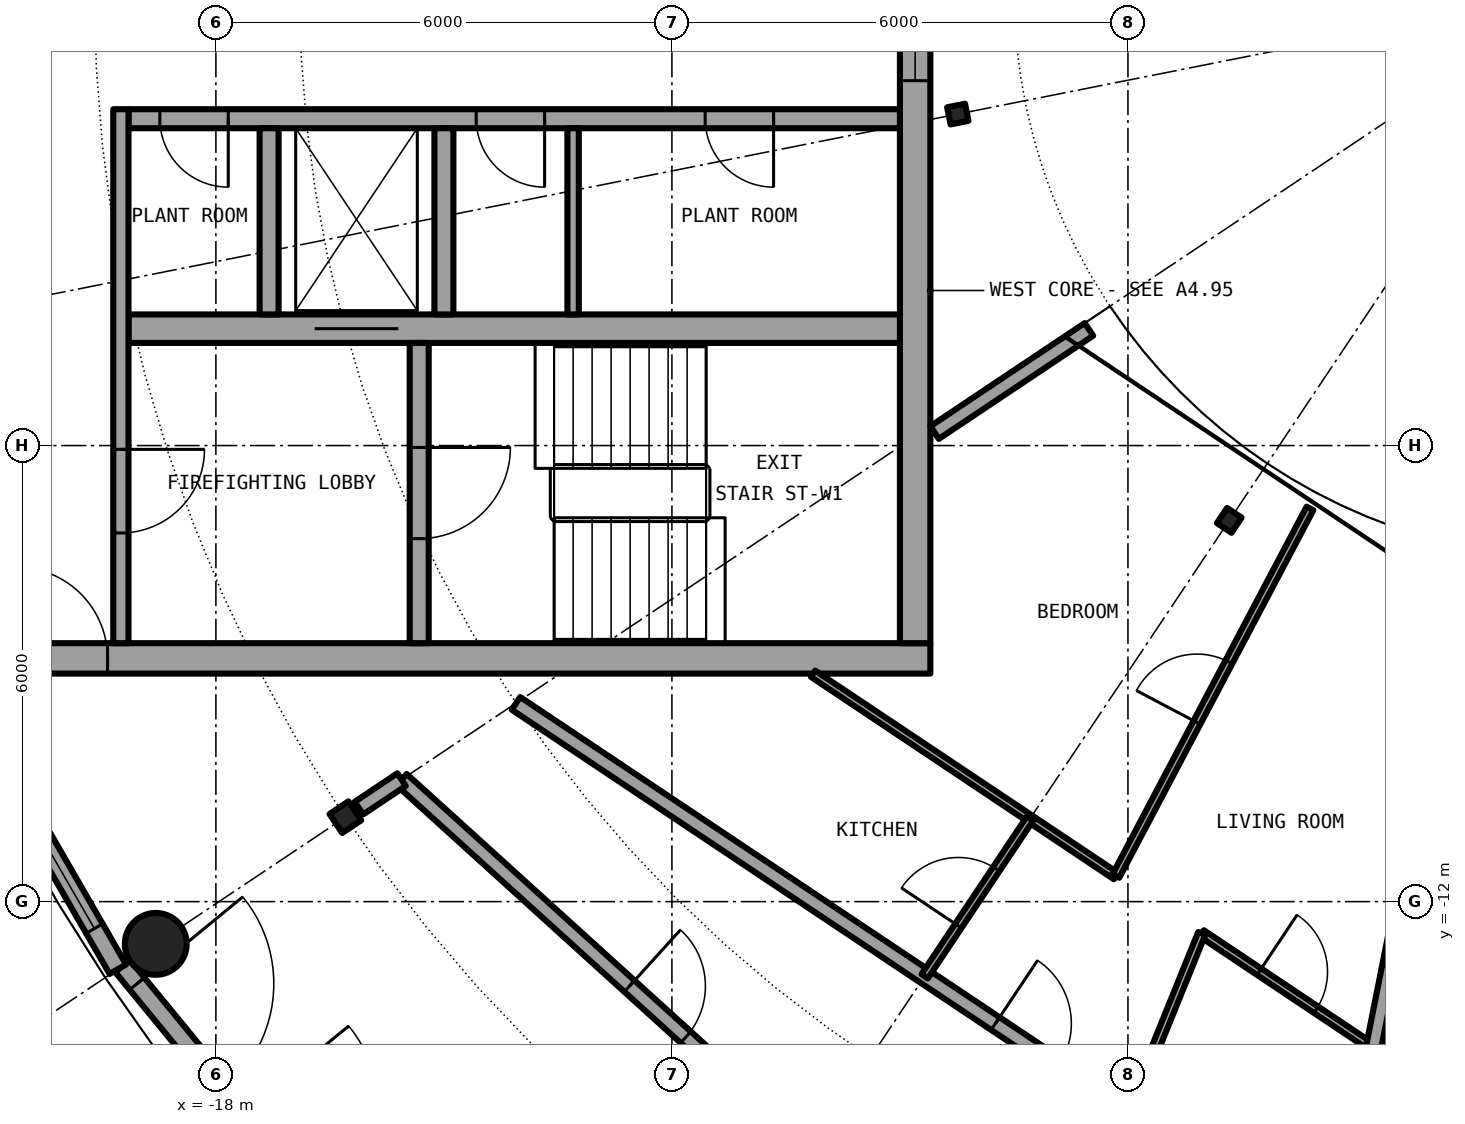
"""IFC4 building model, lengths in metres.
Left out: names, types, materials, properties, quantities, classifications, styles, units other than length and angle.
Written with IfcOpenShell. Run it as: python <this file> out.ifc"""

import sys

from ifc_helpers import new_model, si_unit, direction, frame, frame_2d, origin, origin_2d, place, context, subcontext, project, spatial, rectangle, hollow_circle, i_section, extrude, element, fill, save


model = new_model("IFC4")
c1 = context("Model", 3, precision=1e-05, world=origin(), true_north=direction((0.0, 1.0)))
c2 = subcontext(c1, "Body", "Model", "MODEL_VIEW")
j1 = project(units=[si_unit("LENGTHUNIT", "METRE"), si_unit("PLANEANGLEUNIT", "RADIAN")], contexts=[c1])
p1 = place(None, origin())
s1 = spatial("IfcSite", under=j1, at=p1, CompositionType="ELEMENT")
p2 = place(p1, origin())
s2 = spatial("IfcBuilding", under=s1, at=p2, CompositionType="ELEMENT")
p3 = place(p2, frame((0.0, 0.0, 249.3)))
s3 = spatial("IfcBuildingStorey", under=s2, at=p3, CompositionType="ELEMENT", Elevation=249.3)
p4 = place(p3, frame((-18.791, -12.556, 0.0), z_axis=(0.0, 0.0, 1.0), x_axis=(1.0, 0.0, 0.0)))
e1 = element("IfcColumn", 1, at=p4, inside=s3, PredefinedType="COLUMN", context=c2, shape_type="SweptSolid", body=[
    extrude(hollow_circle(Radius=0.406, WallThickness=0.03, at=origin_2d()), origin(), (0.0, 0.0, 1.0), 3.05),
])
p5 = place(p3, frame((-16.297, -10.889, 0.0), z_axis=(0.0, 0.0, 1.0), x_axis=(-0.831469612303, -0.55557023302, 0.0)))
e2 = element("IfcColumn", 2, at=p5, inside=s3, PredefinedType="COLUMN", context=c2, shape_type="SweptSolid", body=[
    extrude(i_section(OverallWidth=0.3, OverallDepth=0.3, WebThickness=0.011, FlangeThickness=0.019, FilletRadius=0.027, at=origin_2d()), origin(), (0.0, 0.0, 1.0), 3.05),
])
for number, where, z_axis, x_axis in (
    (3, (-8.239, -1.639, 0.0), (0.0, 0.0, 1.0), (-0.981, -0.195, 0.0)),
    (4, (-4.667, -6.984, 0.0), (0.0, 0.0, 1.0), (-0.556, -0.831, 0.0)),
):
    element("IfcColumn", number, at=place(p3, frame(where, z_axis=z_axis, x_axis=x_axis)), inside=s3, PredefinedType="COLUMN", context=c2, shape_type="SweptSolid", body=[
        extrude(i_section(OverallWidth=0.24, OverallDepth=0.23, WebThickness=0.008, FlangeThickness=0.012, FilletRadius=0.021, at=origin_2d()), origin(), (0.0, 0.0, 1.0), 3.05),
    ])
p6 = place(p3, frame((-19.228, -12.848, 0.0), z_axis=(0.0, 0.0, 1.0), x_axis=(0.634418942337, -0.772989395532, 0.0)))
e5 = element("IfcWall", 5, at=p6, inside=s3, PredefinedType="SOLIDWALL", context=c2, shape_type="SweptSolid", body=[
    extrude(rectangle(XDim=4.533, YDim=0.25, at=frame_2d((2.267, 0.0))), origin(), (0.0, 0.0, 1.0), 2.7),
])
p7 = place(p6, frame((0.3, 0.0, 0.0)))
e6 = element("IfcOpeningElement", 6, at=p7, cuts=e5, PredefinedType="OPENING", context=c2, shape_type="SweptSolid", body=[
    extrude(rectangle(XDim=1.8, YDim=2.2, at=frame_2d((0.9, 1.1))), frame((0.0, 0.135, 0.0), z_axis=(0.0, -1.0, 0.0), x_axis=(1.0, 0.0, 0.0)), (0.0, 0.0, 1.0), 0.27),
])
p8 = place(p6, frame((2.497, 0.0, 0.0)))
e7 = element("IfcOpeningElement", 7, at=p8, cuts=e5, PredefinedType="OPENING", context=c2, shape_type="SweptSolid", body=[
    extrude(rectangle(XDim=1.8, YDim=2.2, at=frame_2d((0.9, 1.1))), frame((0.0, 0.135, 0.0), z_axis=(0.0, -1.0, 0.0), x_axis=(1.0, 0.0, 0.0)), (0.0, 0.0, 1.0), 0.27),
])
p9 = place(p3, frame((-20.807, -10.261, 0.0), z_axis=(0.0, 0.0, 1.0), x_axis=(0.499903546559, -0.866081084043, 0.0)))
e8 = element("IfcWall", 8, at=p9, inside=s3, PredefinedType="SOLIDWALL", context=c2, shape_type="SweptSolid", body=[
    extrude(rectangle(XDim=3.034, YDim=0.25, at=frame_2d((1.517, 0.0))), origin(), (0.0, 0.0, 1.0), 2.7),
])
p10 = place(p9, frame((0.617, 0.0, 0.3)))
e9 = element("IfcOpeningElement", 9, at=p10, cuts=e8, PredefinedType="OPENING", context=c2, shape_type="SweptSolid", body=[
    extrude(rectangle(XDim=1.8, YDim=2.1, at=frame_2d((0.9, 1.05))), frame((0.0, 0.135, 0.0), z_axis=(0.0, -1.0, 0.0), x_axis=(1.0, 0.0, 0.0)), (0.0, 0.0, 1.0), 0.27),
])
p11 = place(p3, frame((-21.1, -8.8, 0.0), z_axis=(0.0, 0.0, 1.0), x_axis=(1.0, 0.0, 0.0)))
e10 = element("IfcWall", 10, at=p11, inside=s3, PredefinedType="SHEAR", context=c2, shape_type="SweptSolid", body=[
    extrude(rectangle(XDim=12.5, YDim=0.4, at=frame_2d((6.25, 0.0))), origin(), (0.0, 0.0, 1.0), 3.05),
])
p12 = place(p11, frame((0.475, 0.0, 0.0)))
e11 = element("IfcOpeningElement", 11, at=p12, cuts=e10, PredefinedType="OPENING", context=c2, shape_type="SweptSolid", body=[
    extrude(rectangle(XDim=1.2, YDim=2.3, at=frame_2d((0.6, 1.15))), frame((0.0, 0.21, 0.0), z_axis=(0.0, -1.0, 0.0), x_axis=(1.0, 0.0, 0.0)), (0.0, 0.0, 1.0), 0.42),
])
p13 = place(p3, frame((-8.8, 8.6, 0.0), z_axis=(0.0, 0.0, 1.0), x_axis=(0.0, -1.0, 0.0)))
e12 = element("IfcWall", 12, at=p13, inside=s3, PredefinedType="SHEAR", context=c2, shape_type="SweptSolid", body=[
    extrude(rectangle(XDim=17.2, YDim=0.4, at=frame_2d((8.6, 0.0))), origin(), (0.0, 0.0, 1.0), 3.05),
])
p14 = place(p13, frame((7.4, 0.0, 0.1)))
e13 = element("IfcOpeningElement", 13, at=p14, cuts=e12, PredefinedType="OPENING", context=c2, shape_type="SweptSolid", body=[
    extrude(rectangle(XDim=2.4, YDim=2.2, at=frame_2d((1.2, 1.1))), frame((0.0, 0.21, 0.0), z_axis=(0.0, -1.0, 0.0), x_axis=(1.0, 0.0, 0.0)), (0.0, 0.0, 1.0), 0.42),
])
p15 = place(p3, frame((-9.0, -1.7, 0.0), z_axis=(0.0, 0.0, 1.0), x_axis=(-1.0, 0.0, 0.0)))
e14 = element("IfcWall", 14, at=p15, inside=s3, PredefinedType="SHEAR", context=c2, shape_type="SweptSolid", body=[
    extrude(rectangle(XDim=10.15, YDim=0.25, at=frame_2d((5.075, 0.0))), origin(), (0.0, 0.0, 1.0), 3.05),
])
p16 = place(p15, frame((1.663, 0.0, 0.0)))
e15 = element("IfcOpeningElement", 15, at=p16, cuts=e14, PredefinedType="OPENING", context=c2, shape_type="SweptSolid", body=[
    extrude(rectangle(XDim=0.9, YDim=2.3, at=frame_2d((0.45, 1.15))), frame((0.0, 0.135, 0.0), z_axis=(0.0, -1.0, 0.0), x_axis=(1.0, 0.0, 0.0)), (0.0, 0.0, 1.0), 0.27),
])
p17 = place(p15, frame((4.675, 0.0, 0.0)))
e16 = element("IfcOpeningElement", 16, at=p17, cuts=e14, PredefinedType="OPENING", context=c2, shape_type="SweptSolid", body=[
    extrude(rectangle(XDim=0.9, YDim=2.3, at=frame_2d((0.45, 1.15))), frame((0.0, 0.135, 0.0), z_axis=(0.0, -1.0, 0.0), x_axis=(1.0, 0.0, 0.0)), (0.0, 0.0, 1.0), 0.27),
])
p18 = place(p15, frame((8.837, 0.0, 0.0)))
e17 = element("IfcOpeningElement", 17, at=p18, cuts=e14, PredefinedType="OPENING", context=c2, shape_type="SweptSolid", body=[
    extrude(rectangle(XDim=0.9, YDim=2.3, at=frame_2d((0.45, 1.15))), frame((0.0, 0.135, 0.0), z_axis=(0.0, -1.0, 0.0), x_axis=(1.0, 0.0, 0.0)), (0.0, 0.0, 1.0), 0.27),
])
p19 = place(p3, frame((-9.0, -4.462, 0.0), z_axis=(0.0, 0.0, 1.0), x_axis=(-1.0, 0.0, 0.0)))
e18 = element("IfcWall", 18, at=p19, inside=s3, PredefinedType="SHEAR", context=c2, shape_type="SweptSolid", body=[
    extrude(rectangle(XDim=10.15, YDim=0.375, at=frame_2d((5.075, 0.0))), origin(), (0.0, 0.0, 1.0), 3.05),
])
p20 = place(p19, frame((6.6, 0.0, 0.0)))
e19 = element("IfcOpeningElement", 19, at=p20, cuts=e18, PredefinedType="OPENING", context=c2, shape_type="SweptSolid", body=[
    extrude(rectangle(XDim=1.1, YDim=2.3, at=frame_2d((0.55, 1.15))), frame((0.0, 0.198, 0.0), z_axis=(0.0, -1.0, 0.0), x_axis=(1.0, 0.0, 0.0)), (0.0, 0.0, 1.0), 0.395),
])
p21 = place(p3, frame((-15.325, -4.65, 0.0), z_axis=(0.0, 0.0, 1.0), x_axis=(0.0, -1.0, 0.0)))
e20 = element("IfcWall", 20, at=p21, inside=s3, PredefinedType="SHEAR", context=c2, shape_type="SweptSolid", body=[
    extrude(rectangle(XDim=3.95, YDim=0.25, at=frame_2d((1.975, 0.0))), origin(), (0.0, 0.0, 1.0), 3.05),
])
p22 = place(p21, frame((1.375, 0.0, 0.0)))
e21 = element("IfcOpeningElement", 21, at=p22, cuts=e20, PredefinedType="OPENING", context=c2, shape_type="SweptSolid", body=[
    extrude(rectangle(XDim=1.2, YDim=2.3, at=frame_2d((0.6, 1.15))), frame((0.0, 0.135, 0.0), z_axis=(0.0, -1.0, 0.0), x_axis=(1.0, 0.0, 0.0)), (0.0, 0.0, 1.0), 0.27),
])
for number, where, z_axis, x_axis in (
    (22, (-15.0, -1.825, 0.0), (0.0, 0.0, 1.0), (0.0, -1.0, 0.0)),
    (23, (-17.3, -1.825, 0.0), (0.0, 0.0, 1.0), (0.0, -1.0, 0.0)),
):
    element("IfcWall", number, at=place(p3, frame(where, z_axis=z_axis, x_axis=x_axis)), inside=s3, PredefinedType="SOLIDWALL", context=c2, shape_type="SweptSolid", body=[
        extrude(rectangle(XDim=2.45, YDim=0.25, at=frame_2d((1.225, 0.0))), origin(), (0.0, 0.0, 1.0), 2.7),
    ])
p23 = place(p3, frame((-19.25, -1.575, 0.0), z_axis=(0.0, 0.0, 1.0), x_axis=(0.0, -1.0, 0.0)))
e24 = element("IfcWall", 24, at=p23, inside=s3, PredefinedType="SOLIDWALL", context=c2, shape_type="SweptSolid", body=[
    extrude(rectangle(XDim=7.025, YDim=0.2, at=frame_2d((3.513, 0.0))), origin(), (0.0, 0.0, 1.0), 2.7),
])
p24 = place(p23, frame((4.475, 0.0, 0.0)))
e25 = element("IfcOpeningElement", 25, at=p24, cuts=e24, PredefinedType="OPENING", context=c2, shape_type="SweptSolid", body=[
    extrude(rectangle(XDim=1.1, YDim=2.3, at=frame_2d((0.55, 1.15))), frame((0.0, 0.11, 0.0), z_axis=(0.0, -1.0, 0.0), x_axis=(1.0, 0.0, 0.0)), (0.0, 0.0, 1.0), 0.22),
])
p25 = place(p3, frame((-13.3, -1.825, 0.0), z_axis=(0.0, 0.0, 1.0), x_axis=(0.0, -1.0, 0.0)))
e26 = element("IfcWall", 26, at=p25, inside=s3, PredefinedType="PARTITIONING", context=c2, shape_type="SweptSolid", body=[
    extrude(rectangle(XDim=2.45, YDim=0.15, at=frame_2d((1.225, 0.0))), origin(), (0.0, 0.0, 1.0), 2.7),
])
p26 = place(p3, frame((-15.557, -10.395, 0.0), z_axis=(0.0, 0.0, 1.0), x_axis=(0.740947701955, -0.671562731967, 0.0)))
e27 = element("IfcWall", 27, at=p26, inside=s3, PredefinedType="PARTITIONING", context=c2, shape_type="SweptSolid", body=[
    extrude(rectangle(XDim=9.092, YDim=0.2, at=frame_2d((4.546, 0.0))), origin(), (0.0, 0.0, 1.0), 2.7),
])
p27 = place(p26, frame((4.046, 0.0, 0.0)))
e28 = element("IfcOpeningElement", 28, at=p27, cuts=e27, PredefinedType="OPENING", context=c2, shape_type="SweptSolid", body=[
    extrude(rectangle(XDim=1.0, YDim=2.3, at=frame_2d((0.5, 1.15))), frame((0.0, 0.11, 0.0), z_axis=(0.0, -1.0, 0.0), x_axis=(1.0, 0.0, 0.0)), (0.0, 0.0, 1.0), 0.22),
])
p28 = place(p3, frame((-14.052, -9.392, 0.0), z_axis=(0.0, 0.0, 1.0), x_axis=(0.831588235223, -0.555392660231, 0.0)))
e29 = element("IfcWall", 29, at=p28, inside=s3, PredefinedType="PARTITIONING", context=c2, shape_type="SweptSolid", body=[
    extrude(rectangle(XDim=12.933, YDim=0.2, at=frame_2d((6.466, 0.0))), origin(), (0.0, 0.0, 1.0), 2.7),
])
p29 = place(p28, frame((7.585, 0.0, 0.0)))
e30 = element("IfcOpeningElement", 30, at=p29, cuts=e29, PredefinedType="OPENING", context=c2, shape_type="SweptSolid", body=[
    extrude(rectangle(XDim=1.0, YDim=2.3, at=frame_2d((0.5, 1.15))), frame((0.0, 0.11, 0.0), z_axis=(0.0, -1.0, 0.0), x_axis=(1.0, 0.0, 0.0)), (0.0, 0.0, 1.0), 0.22),
])
p30 = place(p3, frame((-2.772, -13.927, 0.0), z_axis=(0.0, 0.0, 1.0), x_axis=(0.998804891239, 0.048875241559, 0.0)))
e31 = element("IfcWall", 31, at=p30, inside=s3, PredefinedType="PARTITIONING", context=c2, shape_type="SweptSolid", body=[
    extrude(rectangle(XDim=2.762, YDim=0.1, at=frame_2d((1.381, 0.0))), origin(), (0.0, 0.0, 1.0), 2.7),
])
p31 = place(p30, frame((0.931, 0.0, 0.0)))
e32 = element("IfcOpeningElement", 32, at=p31, cuts=e31, PredefinedType="OPENING", context=c2, shape_type="SweptSolid", body=[
    extrude(rectangle(XDim=0.9, YDim=2.3, at=frame_2d((0.45, 1.15))), frame((0.0, 0.06, 0.0), z_axis=(0.0, -1.0, 0.0), x_axis=(1.0, 0.0, 0.0)), (0.0, 0.0, 1.0), 0.12),
])
p32 = place(p3, frame((-10.143, -9.002, 0.0), z_axis=(0.0, 0.0, 1.0), x_axis=(0.831595529181, -0.555381738849, 0.0)))
e33 = element("IfcWall", 33, at=p32, inside=s3, PredefinedType="PARTITIONING", context=c2, shape_type="SweptSolid", body=[
    extrude(rectangle(XDim=4.793, YDim=0.1, at=frame_2d((2.396, 0.0))), origin(), (0.0, 0.0, 1.0), 2.7),
])
p33 = place(p3, frame((-5.029, -12.418, 0.0), z_axis=(0.0, 0.0, 1.0), x_axis=(0.831538390496, -0.555467285384, 0.0)))
e34 = element("IfcWall", 34, at=p33, inside=s3, PredefinedType="PARTITIONING", context=c2, shape_type="SweptSolid", body=[
    extrude(rectangle(XDim=2.717, YDim=0.1, at=frame_2d((1.358, 0.0))), origin(), (0.0, 0.0, 1.0), 2.7),
])
p34 = place(p33, frame((0.908, 0.0, 0.0)))
e35 = element("IfcOpeningElement", 35, at=p34, cuts=e34, PredefinedType="OPENING", context=c2, shape_type="SweptSolid", body=[
    extrude(rectangle(XDim=0.9, YDim=2.3, at=frame_2d((0.45, 1.15))), frame((0.0, 0.06, 0.0), z_axis=(0.0, -1.0, 0.0), x_axis=(1.0, 0.0, 0.0)), (0.0, 0.0, 1.0), 0.12),
])
p35 = place(p3, frame((-6.513, -4.472, 0.0), z_axis=(0.0, 0.0, 1.0), x_axis=(-0.831450132577, -0.555599385382, 0.0)))
e36 = element("IfcWall", 36, at=p35, inside=s3, PredefinedType="PARTITIONING", context=c2, shape_type="SweptSolid", body=[
    extrude(rectangle(XDim=2.443, YDim=0.2, at=frame_2d((1.221, 0.0))), origin(), (0.0, 0.0, 1.0), 2.7),
])
p36 = place(p3, frame((-16.118, -10.77, 0.0), z_axis=(0.0, 0.0, 1.0), x_axis=(0.831381780519, 0.555701660086, 0.0)))
e37 = element("IfcWall", 37, at=p36, inside=s3, PredefinedType="PARTITIONING", context=c2, shape_type="SweptSolid", body=[
    extrude(rectangle(XDim=0.675, YDim=0.2, at=frame_2d((0.337, 0.0))), origin(), (0.0, 0.0, 1.0), 2.7),
])
p37 = place(p3, frame((-8.674, -12.982, 0.0), z_axis=(0.0, 0.0, 1.0), x_axis=(0.555355163998, 0.831613276602, 0.0)))
e38 = element("IfcWall", 38, at=p37, inside=s3, PredefinedType="PARTITIONING", context=c2, shape_type="SweptSolid", body=[
    extrude(rectangle(XDim=2.494, YDim=0.1, at=frame_2d((1.247, 0.0))), origin(), (0.0, 0.0, 1.0), 2.7),
])
p38 = place(p37, frame((0.797, 0.0, 0.0)))
e39 = element("IfcOpeningElement", 39, at=p38, cuts=e38, PredefinedType="OPENING", context=c2, shape_type="SweptSolid", body=[
    extrude(rectangle(XDim=0.9, YDim=2.3, at=frame_2d((0.45, 1.15))), frame((0.0, 0.06, 0.0), z_axis=(0.0, -1.0, 0.0), x_axis=(1.0, 0.0, 0.0)), (0.0, 0.0, 1.0), 0.12),
])
p39 = place(p3, frame((-6.159, -11.663, 0.0), z_axis=(0.0, 0.0, 1.0), x_axis=(0.466976820365, 0.884269556889, 0.0)))
e40 = element("IfcWall", 40, at=p39, inside=s3, PredefinedType="PARTITIONING", context=c2, shape_type="SweptSolid", body=[
    extrude(rectangle(XDim=5.469, YDim=0.1, at=frame_2d((2.735, 0.0))), origin(), (0.0, 0.0, 1.0), 2.7),
])
p40 = place(p39, frame((2.284, 0.0, 0.0)))
e41 = element("IfcOpeningElement", 41, at=p40, cuts=e40, PredefinedType="OPENING", context=c2, shape_type="SweptSolid", body=[
    extrude(rectangle(XDim=0.9, YDim=2.3, at=frame_2d((0.45, 1.15))), frame((0.0, 0.06, 0.0), z_axis=(0.0, -1.0, 0.0), x_axis=(1.0, 0.0, 0.0)), (0.0, 0.0, 1.0), 0.12),
])
p41 = place(p3, frame((-5.986, -14.779, 0.0), z_axis=(0.0, 0.0, 1.0), x_axis=(0.375649498413, 0.926761811008, 0.0)))
e42 = element("IfcWall", 42, at=p41, inside=s3, PredefinedType="PARTITIONING", context=c2, shape_type="SweptSolid", body=[
    extrude(rectangle(XDim=2.548, YDim=0.1, at=frame_2d((1.274, 0.0))), origin(), (0.0, 0.0, 1.0), 2.7),
])
p42 = place(p3, frame((-3.297, -16.575, 0.0), z_axis=(0.0, 0.0, 1.0), x_axis=(0.19524145691, 0.980755205698, 0.0)))
e43 = element("IfcWall", 43, at=p42, inside=s3, PredefinedType="PARTITIONING", context=c2, shape_type="SweptSolid", body=[
    extrude(rectangle(XDim=9.18, YDim=0.2, at=frame_2d((4.59, 0.0))), origin(), (0.0, 0.0, 1.0), 2.7),
])
p43 = place(p7, origin())
e44 = element("IfcDoor", 44, at=p43, inside=s3, OperationType="SINGLE_SWING_LEFT", PredefinedType="DOOR", context=c2, shape_type="SweptSolid", body=[
    extrude(rectangle(XDim=1.8, YDim=2.2, at=frame_2d((0.9, 1.1))), frame((0.0, 0.025, 0.0), z_axis=(0.0, -1.0, 0.0), x_axis=(1.0, 0.0, 0.0)), (0.0, 0.0, 1.0), 0.05),
])
fill(e6, e44)
p44 = place(p10, origin())
e45 = element("IfcWindow", 45, at=p44, inside=s3, PartitioningType="SINGLE_PANEL", PredefinedType="WINDOW", context=c2, shape_type="SweptSolid", body=[
    extrude(rectangle(XDim=1.8, YDim=2.1, at=frame_2d((0.9, 1.05))), frame((0.0, 0.03, 0.0), z_axis=(0.0, -1.0, 0.0), x_axis=(1.0, 0.0, 0.0)), (0.0, 0.0, 1.0), 0.06),
])
fill(e9, e45)
p45 = place(p20, origin())
e46 = element("IfcDoor", 46, at=p45, inside=s3, OperationType="DOUBLE_DOOR_SLIDING", PredefinedType="DOOR", context=c2, shape_type="SweptSolid", body=[
    extrude(rectangle(XDim=1.1, YDim=2.3, at=frame_2d((0.55, 1.15))), frame((0.0, 0.025, 0.0), z_axis=(0.0, -1.0, 0.0), x_axis=(1.0, 0.0, 0.0)), (0.0, 0.0, 1.0), 0.05),
])
fill(e19, e46)
p46 = place(p16, origin())
e47 = element("IfcDoor", 47, at=p46, inside=s3, OperationType="SINGLE_SWING_RIGHT", PredefinedType="DOOR", context=c2, shape_type="SweptSolid", body=[
    extrude(rectangle(XDim=0.9, YDim=2.3, at=frame_2d((0.45, 1.15))), frame((0.0, 0.025, 0.0), z_axis=(0.0, -1.0, 0.0), x_axis=(1.0, 0.0, 0.0)), (0.0, 0.0, 1.0), 0.05),
])
fill(e15, e47)
p47 = place(p17, origin())
e48 = element("IfcDoor", 48, at=p47, inside=s3, OperationType="SINGLE_SWING_LEFT", PredefinedType="DOOR", context=c2, shape_type="SweptSolid", body=[
    extrude(rectangle(XDim=0.9, YDim=2.3, at=frame_2d((0.45, 1.15))), frame((0.0, 0.025, 0.0), z_axis=(0.0, -1.0, 0.0), x_axis=(1.0, 0.0, 0.0)), (0.0, 0.0, 1.0), 0.05),
])
fill(e16, e48)
p48 = place(p18, origin())
e49 = element("IfcDoor", 49, at=p48, inside=s3, OperationType="SINGLE_SWING_LEFT", PredefinedType="DOOR", context=c2, shape_type="SweptSolid", body=[
    extrude(rectangle(XDim=0.9, YDim=2.3, at=frame_2d((0.45, 1.15))), frame((0.0, 0.025, 0.0), z_axis=(0.0, -1.0, 0.0), x_axis=(1.0, 0.0, 0.0)), (0.0, 0.0, 1.0), 0.05),
])
fill(e17, e49)
p49 = place(p22, origin())
e50 = element("IfcDoor", 50, at=p49, inside=s3, OperationType="SINGLE_SWING_LEFT", PredefinedType="DOOR", context=c2, shape_type="SweptSolid", body=[
    extrude(rectangle(XDim=1.2, YDim=2.3, at=frame_2d((0.6, 1.15))), frame((0.0, 0.025, 0.0), z_axis=(0.0, -1.0, 0.0), x_axis=(1.0, 0.0, 0.0)), (0.0, 0.0, 1.0), 0.05),
])
fill(e21, e50)
p50 = place(p24, origin())
e51 = element("IfcDoor", 51, at=p50, inside=s3, OperationType="SINGLE_SWING_LEFT", PredefinedType="DOOR", context=c2, shape_type="SweptSolid", body=[
    extrude(rectangle(XDim=1.1, YDim=2.3, at=frame_2d((0.55, 1.15))), frame((0.0, 0.025, 0.0), z_axis=(0.0, -1.0, 0.0), x_axis=(1.0, 0.0, 0.0)), (0.0, 0.0, 1.0), 0.05),
])
fill(e25, e51)
p51 = place(p12, origin())
e52 = element("IfcDoor", 52, at=p51, inside=s3, OperationType="SINGLE_SWING_RIGHT", PredefinedType="DOOR", context=c2, shape_type="SweptSolid", body=[
    extrude(rectangle(XDim=1.2, YDim=2.3, at=frame_2d((0.6, 1.15))), frame((0.0, 0.025, 0.0), z_axis=(0.0, -1.0, 0.0), x_axis=(1.0, 0.0, 0.0)), (0.0, 0.0, 1.0), 0.05),
])
fill(e11, e52)
p52 = place(p14, origin())
e53 = element("IfcWindow", 53, at=p52, inside=s3, PartitioningType="SINGLE_PANEL", PredefinedType="WINDOW", context=c2, shape_type="SweptSolid", body=[
    extrude(rectangle(XDim=2.4, YDim=2.2, at=frame_2d((1.2, 1.1))), frame((0.0, 0.03, 0.0), z_axis=(0.0, -1.0, 0.0), x_axis=(1.0, 0.0, 0.0)), (0.0, 0.0, 1.0), 0.06),
])
fill(e13, e53)
p53 = place(p27, origin())
e54 = element("IfcDoor", 54, at=p53, inside=s3, OperationType="SINGLE_SWING_RIGHT", PredefinedType="DOOR", context=c2, shape_type="SweptSolid", body=[
    extrude(rectangle(XDim=1.0, YDim=2.3, at=frame_2d((0.5, 1.15))), frame((0.0, 0.025, 0.0), z_axis=(0.0, -1.0, 0.0), x_axis=(1.0, 0.0, 0.0)), (0.0, 0.0, 1.0), 0.05),
])
fill(e28, e54)
p54 = place(p29, origin())
e55 = element("IfcDoor", 55, at=p54, inside=s3, OperationType="SINGLE_SWING_RIGHT", PredefinedType="DOOR", context=c2, shape_type="SweptSolid", body=[
    extrude(rectangle(XDim=1.0, YDim=2.3, at=frame_2d((0.5, 1.15))), frame((0.0, 0.025, 0.0), z_axis=(0.0, -1.0, 0.0), x_axis=(1.0, 0.0, 0.0)), (0.0, 0.0, 1.0), 0.05),
])
fill(e30, e55)
p55 = place(p34, origin())
e56 = element("IfcDoor", 56, at=p55, inside=s3, OperationType="SINGLE_SWING_LEFT", PredefinedType="DOOR", context=c2, shape_type="SweptSolid", body=[
    extrude(rectangle(XDim=0.9, YDim=2.3, at=frame_2d((0.45, 1.15))), frame((0.0, 0.025, 0.0), z_axis=(0.0, -1.0, 0.0), x_axis=(1.0, 0.0, 0.0)), (0.0, 0.0, 1.0), 0.05),
])
fill(e35, e56)
p56 = place(p38, origin())
e57 = element("IfcDoor", 57, at=p56, inside=s3, OperationType="SINGLE_SWING_RIGHT", PredefinedType="DOOR", context=c2, shape_type="SweptSolid", body=[
    extrude(rectangle(XDim=0.9, YDim=2.3, at=frame_2d((0.45, 1.15))), frame((0.0, 0.025, 0.0), z_axis=(0.0, -1.0, 0.0), x_axis=(1.0, 0.0, 0.0)), (0.0, 0.0, 1.0), 0.05),
])
fill(e39, e57)
p57 = place(p40, origin())
e58 = element("IfcDoor", 58, at=p57, inside=s3, OperationType="SINGLE_SWING_LEFT", PredefinedType="DOOR", context=c2, shape_type="SweptSolid", body=[
    extrude(rectangle(XDim=0.9, YDim=2.3, at=frame_2d((0.45, 1.15))), frame((0.0, 0.025, 0.0), z_axis=(0.0, -1.0, 0.0), x_axis=(1.0, 0.0, 0.0)), (0.0, 0.0, 1.0), 0.05),
])
fill(e41, e58)
save(model, sys.argv[1])
